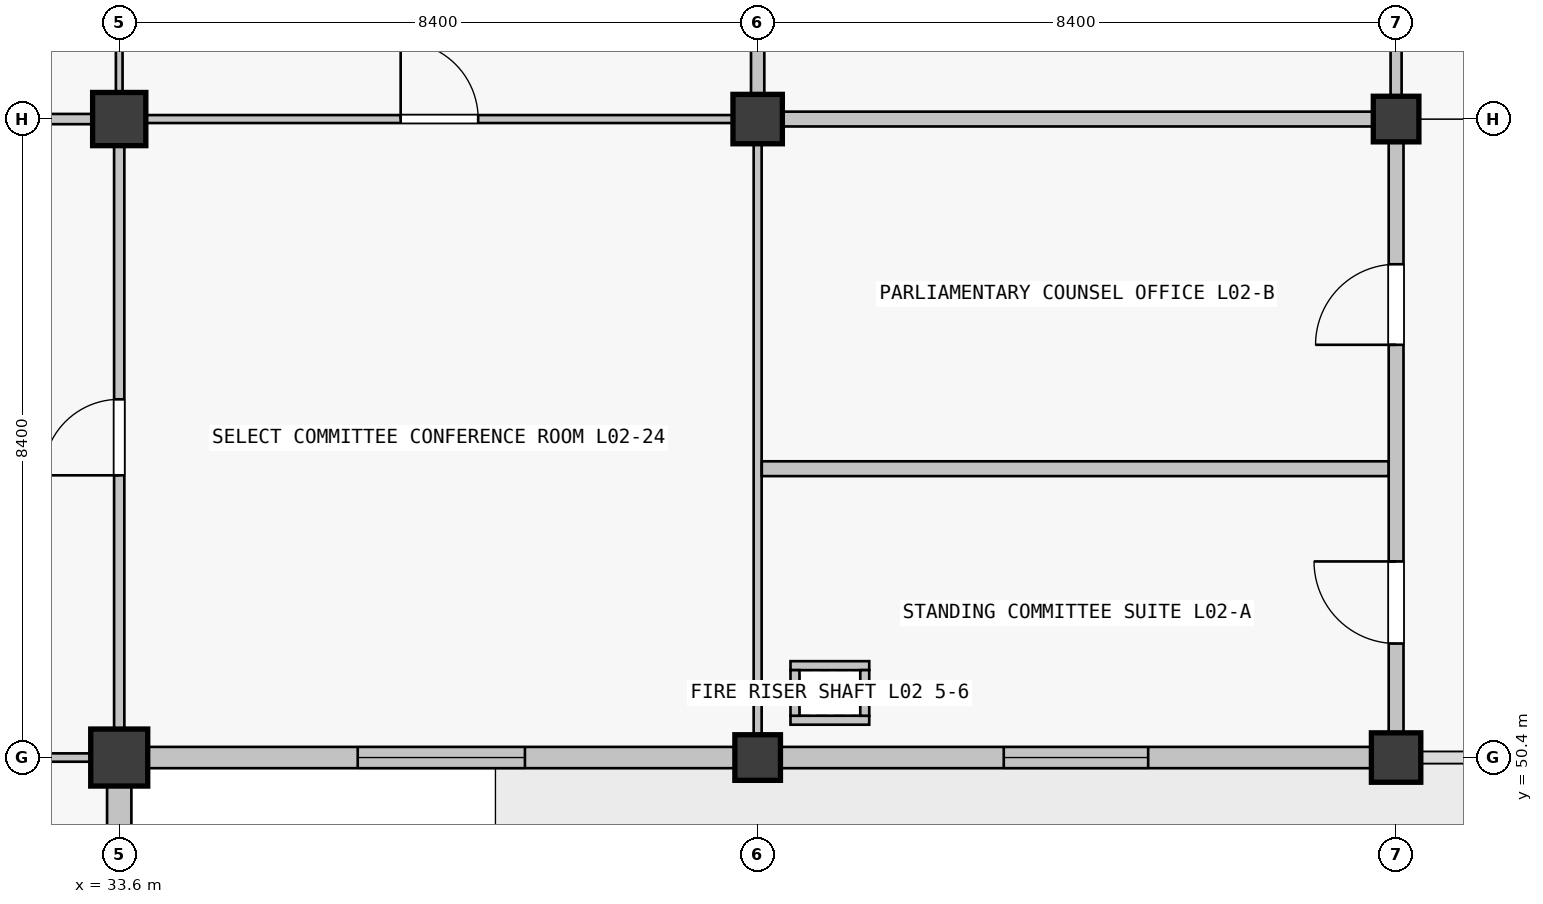
"""IFC4 building model, lengths in metres.
Left out: names, types, materials, properties, quantities, classifications, styles, units other than length and angle.
Written with IfcOpenShell. Run it as: python <this file> out.ifc"""

import sys

from ifc_helpers import new_model, si_unit, direction, frame, frame_2d, origin, origin_2d, place, context, subcontext, project, spatial, rectangle, extrude, element, fill, save


model = new_model("IFC4")
c1 = context("Model", 3, precision=1e-05, world=origin(), true_north=direction((0.0, 1.0)))
c2 = subcontext(c1, "Body", "Model", "MODEL_VIEW")
j1 = project(units=[si_unit("LENGTHUNIT", "METRE"), si_unit("PLANEANGLEUNIT", "RADIAN")], contexts=[c1])
p1 = place(None, origin())
s1 = spatial("IfcSite", under=j1, at=p1, CompositionType="ELEMENT")
p2 = place(p1, origin())
s2 = spatial("IfcBuilding", under=s1, at=p2, CompositionType="ELEMENT")
p3 = place(p2, frame((0.0, 0.0, 10.26)))
s3 = spatial("IfcBuildingStorey", under=s2, at=p3, CompositionType="ELEMENT", Elevation=10.26)
p4 = place(p3, frame((33.6, 50.4, 0.0), z_axis=(0.0, 0.0, 1.0), x_axis=(1.0, 0.0, 0.0)))
e1 = element("IfcColumn", 1, at=p4, inside=s3, PredefinedType="COLUMN", context=c2, shape_type="SweptSolid", body=[
    extrude(rectangle(XDim=0.75, YDim=0.75, at=origin_2d()), origin(), (0.0, 0.0, 1.0), 4.5),
])
p5 = place(p3, frame((33.6, 58.8, 0.0), z_axis=(0.0, 0.0, 1.0), x_axis=(1.0, 0.0, 0.0)))
e2 = element("IfcColumn", 2, at=p5, inside=s3, PredefinedType="COLUMN", context=c2, shape_type="SweptSolid", body=[
    extrude(rectangle(XDim=0.7, YDim=0.7, at=origin_2d()), origin(), (0.0, 0.0, 1.0), 4.5),
])
p6 = place(p3, frame((42.0, 50.4, 0.0), z_axis=(0.0, 0.0, 1.0), x_axis=(1.0, 0.0, 0.0)))
e3 = element("IfcColumn", 3, at=p6, inside=s3, PredefinedType="COLUMN", context=c2, shape_type="SweptSolid", body=[
    extrude(rectangle(XDim=0.6, YDim=0.6, at=origin_2d()), origin(), (0.0, 0.0, 1.0), 4.5),
])
for number, where, z_axis, x_axis in (
    (4, (42.0, 58.8, 0.0), (0.0, 0.0, 1.0), (1.0, 0.0, 0.0)),
    (5, (50.4, 50.4, 0.0), (0.0, 0.0, 1.0), (1.0, 0.0, 0.0)),
):
    element("IfcColumn", number, at=place(p3, frame(where, z_axis=z_axis, x_axis=x_axis)), inside=s3, PredefinedType="COLUMN", context=c2, shape_type="SweptSolid", body=[
        extrude(rectangle(XDim=0.65, YDim=0.65, at=origin_2d()), origin(), (0.0, 0.0, 1.0), 4.5),
    ])
p7 = place(p3, frame((50.4, 58.8, 0.0), z_axis=(0.0, 0.0, 1.0), x_axis=(1.0, 0.0, 0.0)))
e6 = element("IfcColumn", 6, at=p7, inside=s3, PredefinedType="COLUMN", context=c2, shape_type="SweptSolid", body=[
    extrude(rectangle(XDim=0.6, YDim=0.6, at=origin_2d()), origin(), (0.0, 0.0, 1.0), 4.5),
])
p8 = place(p3, frame((33.6, 50.024, 0.0), z_axis=(0.0, 0.0, 1.0), x_axis=(0.0, -1.0, 0.0)))
e7 = element("IfcWall", 7, at=p8, inside=s3, PredefinedType="SOLIDWALL", context=c2, shape_type="SweptSolid", body=[
    extrude(rectangle(XDim=7.673, YDim=0.32, at=frame_2d((3.836, 0.0))), origin(), (0.0, 0.0, 1.0), 3.54),
])
p9 = place(p8, frame((3.236, 0.0, 0.9)))
e8 = element("IfcOpeningElement", 8, at=p9, cuts=e7, PredefinedType="OPENING", context=c2, shape_type="SweptSolid", body=[
    extrude(rectangle(XDim=1.2, YDim=2.1, at=frame_2d((0.6, 1.05))), frame((0.0, 0.16, 0.0), z_axis=(0.0, -1.0, 0.0), x_axis=(1.0, 0.0, 0.0)), (0.0, 0.0, 1.0), 0.32),
])
p10 = place(p3, frame((41.699, 50.4, 0.0), z_axis=(0.0, 0.0, 1.0), x_axis=(-1.0, 0.0, 0.0)))
e9 = element("IfcWall", 9, at=p10, inside=s3, PredefinedType="SOLIDWALL", context=c2, shape_type="SweptSolid", body=[
    extrude(rectangle(XDim=7.723, YDim=0.28, at=frame_2d((3.861, 0.0))), origin(), (0.0, 0.0, 1.0), 3.54),
])
p11 = place(p10, frame((2.761, 0.0, 0.9)))
e10 = element("IfcOpeningElement", 10, at=p11, cuts=e9, PredefinedType="OPENING", context=c2, shape_type="SweptSolid", body=[
    extrude(rectangle(XDim=2.2, YDim=1.35, at=frame_2d((1.1, 0.675))), frame((0.0, 0.14, 0.0), z_axis=(0.0, -1.0, 0.0), x_axis=(1.0, 0.0, 0.0)), (0.0, 0.0, 1.0), 0.28),
])
p12 = place(p3, frame((50.074, 50.4, 0.0), z_axis=(0.0, 0.0, 1.0), x_axis=(-1.0, 0.0, 0.0)))
e11 = element("IfcWall", 11, at=p12, inside=s3, PredefinedType="SOLIDWALL", context=c2, shape_type="SweptSolid", body=[
    extrude(rectangle(XDim=7.773, YDim=0.28, at=frame_2d((3.886, 0.0))), origin(), (0.0, 0.0, 1.0), 3.54),
])
p13 = place(p12, frame((2.936, 0.0, 0.9)))
e12 = element("IfcOpeningElement", 12, at=p13, cuts=e11, PredefinedType="OPENING", context=c2, shape_type="SweptSolid", body=[
    extrude(rectangle(XDim=1.9, YDim=1.75, at=frame_2d((0.95, 0.875))), frame((0.0, 0.14, 0.0), z_axis=(0.0, -1.0, 0.0), x_axis=(1.0, 0.0, 0.0)), (0.0, 0.0, 1.0), 0.28),
])
for number, where, z_axis, x_axis in (
    (13, (42.432, 50.891, 0.0), (0.0, 0.0, 1.0), (1.0, 0.0, 0.0)),
    (14, (42.432, 51.609, 0.0), (0.0, 0.0, 1.0), (1.0, 0.0, 0.0)),
):
    element("IfcWall", number, at=place(p3, frame(where, z_axis=z_axis, x_axis=x_axis)), inside=s3, PredefinedType="PARTITIONING", context=c2, shape_type="SweptSolid", body=[
        extrude(rectangle(XDim=1.036, YDim=0.118, at=frame_2d((0.518, 0.0))), origin(), (0.0, 0.0, 1.0), 3.53),
    ])
for number, where, z_axis, x_axis in (
    (15, (42.491, 50.95, 0.0), (0.0, 0.0, 1.0), (0.0, 1.0, 0.0)),
    (16, (43.409, 50.95, 0.0), (0.0, 0.0, 1.0), (0.0, 1.0, 0.0)),
):
    element("IfcWall", number, at=place(p3, frame(where, z_axis=z_axis, x_axis=x_axis)), inside=s3, PredefinedType="PARTITIONING", context=c2, shape_type="SweptSolid", body=[
        extrude(rectangle(XDim=0.6, YDim=0.118, at=frame_2d((0.3, 0.0))), origin(), (0.0, 0.0, 1.0), 3.53),
    ])
p14 = place(p3, frame((25.552, 50.4, 0.0), z_axis=(0.0, 0.0, 1.0), x_axis=(1.0, 0.0, 0.0)))
e17 = element("IfcWall", 17, at=p14, inside=s3, PredefinedType="MOVABLE", context=c2, shape_type="SweptSolid", body=[
    extrude(rectangle(XDim=7.671, YDim=0.11, at=frame_2d((3.835, 0.0))), origin(), (0.0, 0.0, 1.0), 3.37),
])
p15 = place(p14, frame((3.296, 0.0, 0.0)))
e18 = element("IfcOpeningElement", 18, at=p15, cuts=e17, PredefinedType="OPENING", context=c2, shape_type="SweptSolid", body=[
    extrude(rectangle(XDim=1.08, YDim=2.25, at=frame_2d((0.54, 1.125))), frame((0.0, 0.055, 0.0), z_axis=(0.0, -1.0, 0.0), x_axis=(1.0, 0.0, 0.0)), (0.0, 0.0, 1.0), 0.11),
])
p16 = place(p3, frame((25.577, 58.8, 0.0), z_axis=(0.0, 0.0, 1.0), x_axis=(1.0, 0.0, 0.0)))
e19 = element("IfcWall", 19, at=p16, inside=s3, PredefinedType="PARTITIONING", context=c2, shape_type="SweptSolid", body=[
    extrude(rectangle(XDim=7.671, YDim=0.135, at=frame_2d((3.835, 0.0))), origin(), (0.0, 0.0, 1.0), 3.37),
])
p17 = place(p16, frame((3.306, 0.0, 0.0)))
e20 = element("IfcOpeningElement", 20, at=p17, cuts=e19, PredefinedType="OPENING", context=c2, shape_type="SweptSolid", body=[
    extrude(rectangle(XDim=1.06, YDim=2.25, at=frame_2d((0.53, 1.125))), frame((0.0, 0.067, 0.0), z_axis=(0.0, -1.0, 0.0), x_axis=(1.0, 0.0, 0.0)), (0.0, 0.0, 1.0), 0.135),
])
p18 = place(p3, frame((33.952, 58.8, 0.0), z_axis=(0.0, 0.0, 1.0), x_axis=(1.0, 0.0, 0.0)))
e21 = element("IfcWall", 21, at=p18, inside=s3, PredefinedType="PARTITIONING", context=c2, shape_type="SweptSolid", body=[
    extrude(rectangle(XDim=7.721, YDim=0.105, at=frame_2d((3.861, 0.0))), origin(), (0.0, 0.0, 1.0), 3.37),
])
p19 = place(p18, frame((3.351, 0.0, 0.0)))
e22 = element("IfcOpeningElement", 22, at=p19, cuts=e21, PredefinedType="OPENING", context=c2, shape_type="SweptSolid", body=[
    extrude(rectangle(XDim=1.02, YDim=2.2, at=frame_2d((0.51, 1.1))), frame((0.0, 0.052, 0.0), z_axis=(0.0, -1.0, 0.0), x_axis=(1.0, 0.0, 0.0)), (0.0, 0.0, 1.0), 0.105),
])
p20 = place(p3, frame((42.327, 58.8, 0.0), z_axis=(0.0, 0.0, 1.0), x_axis=(1.0, 0.0, 0.0)))
e23 = element("IfcWall", 23, at=p20, inside=s3, PredefinedType="PARTITIONING", context=c2, shape_type="SweptSolid", body=[
    extrude(rectangle(XDim=7.771, YDim=0.195, at=frame_2d((3.885, 0.0))), origin(), (0.0, 0.0, 1.0), 3.37),
])
p21 = place(p3, frame((33.6, 50.777, 0.0), z_axis=(0.0, 0.0, 1.0), x_axis=(0.0, 1.0, 0.0)))
e24 = element("IfcWall", 24, at=p21, inside=s3, PredefinedType="PARTITIONING", context=c2, shape_type="SweptSolid", body=[
    extrude(rectangle(XDim=7.671, YDim=0.135, at=frame_2d((3.835, 0.0))), origin(), (0.0, 0.0, 1.0), 3.37),
])
p22 = place(p21, frame((3.336, 0.0, 0.0)))
e25 = element("IfcOpeningElement", 25, at=p22, cuts=e24, PredefinedType="OPENING", context=c2, shape_type="SweptSolid", body=[
    extrude(rectangle(XDim=1.0, YDim=2.2, at=frame_2d((0.5, 1.1))), frame((0.0, 0.067, 0.0), z_axis=(0.0, -1.0, 0.0), x_axis=(1.0, 0.0, 0.0)), (0.0, 0.0, 1.0), 0.135),
])
p23 = place(p3, frame((33.6, 59.152, 0.0), z_axis=(0.0, 0.0, 1.0), x_axis=(0.0, 1.0, 0.0)))
e26 = element("IfcWall", 26, at=p23, inside=s3, PredefinedType="PARTITIONING", context=c2, shape_type="SweptSolid", body=[
    extrude(rectangle(XDim=7.671, YDim=0.088, at=frame_2d((3.835, 0.0))), origin(), (0.0, 0.0, 1.0), 3.37),
])
p24 = place(p23, frame((3.365, 0.0, 0.0)))
e27 = element("IfcOpeningElement", 27, at=p24, cuts=e26, PredefinedType="OPENING", context=c2, shape_type="SweptSolid", body=[
    extrude(rectangle(XDim=0.94, YDim=2.15, at=frame_2d((0.47, 1.075))), frame((0.0, 0.044, 0.0), z_axis=(0.0, -1.0, 0.0), x_axis=(1.0, 0.0, 0.0)), (0.0, 0.0, 1.0), 0.088),
])
p25 = place(p3, frame((42.0, 50.702, 0.0), z_axis=(0.0, 0.0, 1.0), x_axis=(0.0, 1.0, 0.0)))
e28 = element("IfcWall", 28, at=p25, inside=s3, PredefinedType="PARTITIONING", context=c2, shape_type="SweptSolid", body=[
    extrude(rectangle(XDim=7.771, YDim=0.105, at=frame_2d((3.885, 0.0))), origin(), (0.0, 0.0, 1.0), 3.37),
])
p26 = place(p3, frame((42.0, 59.127, 0.0), z_axis=(0.0, 0.0, 1.0), x_axis=(0.0, 1.0, 0.0)))
e29 = element("IfcWall", 29, at=p26, inside=s3, PredefinedType="PARTITIONING", context=c2, shape_type="SweptSolid", body=[
    extrude(rectangle(XDim=7.721, YDim=0.175, at=frame_2d((3.86, 0.0))), origin(), (0.0, 0.0, 1.0), 3.37),
])
p27 = place(p3, frame((50.4, 50.727, 0.0), z_axis=(0.0, 0.0, 1.0), x_axis=(0.0, 1.0, 0.0)))
e30 = element("IfcWall", 30, at=p27, inside=s3, PredefinedType="PARTITIONING", context=c2, shape_type="SweptSolid", body=[
    extrude(rectangle(XDim=7.771, YDim=0.195, at=frame_2d((3.885, 0.0))), origin(), (0.0, 0.0, 1.0), 3.37),
])
p28 = place(p27, frame((1.173, 0.0, 0.0)))
e31 = element("IfcOpeningElement", 31, at=p28, cuts=e30, PredefinedType="OPENING", context=c2, shape_type="SweptSolid", body=[
    extrude(rectangle(XDim=1.08, YDim=2.25, at=frame_2d((0.54, 1.125))), frame((0.0, 0.098, 0.0), z_axis=(0.0, -1.0, 0.0), x_axis=(1.0, 0.0, 0.0)), (0.0, 0.0, 1.0), 0.195),
])
p29 = place(p27, frame((5.103, 0.0, 0.0)))
e32 = element("IfcOpeningElement", 32, at=p29, cuts=e30, PredefinedType="OPENING", context=c2, shape_type="SweptSolid", body=[
    extrude(rectangle(XDim=1.06, YDim=2.25, at=frame_2d((0.53, 1.125))), frame((0.0, 0.098, 0.0), z_axis=(0.0, -1.0, 0.0), x_axis=(1.0, 0.0, 0.0)), (0.0, 0.0, 1.0), 0.195),
])
p30 = place(p3, frame((50.4, 59.102, 0.0), z_axis=(0.0, 0.0, 1.0), x_axis=(0.0, 1.0, 0.0)))
e33 = element("IfcWall", 33, at=p30, inside=s3, PredefinedType="PARTITIONING", context=c2, shape_type="SweptSolid", body=[
    extrude(rectangle(XDim=7.721, YDim=0.145, at=frame_2d((3.86, 0.0))), origin(), (0.0, 0.0, 1.0), 3.37),
])
p31 = place(p30, frame((1.218, 0.0, 0.0)))
e34 = element("IfcOpeningElement", 34, at=p31, cuts=e33, PredefinedType="OPENING", context=c2, shape_type="SweptSolid", body=[
    extrude(rectangle(XDim=1.04, YDim=2.2, at=frame_2d((0.52, 1.1))), frame((0.0, 0.073, 0.0), z_axis=(0.0, -1.0, 0.0), x_axis=(1.0, 0.0, 0.0)), (0.0, 0.0, 1.0), 0.145),
])
p32 = place(p30, frame((5.148, 0.0, 0.0)))
e35 = element("IfcOpeningElement", 35, at=p32, cuts=e33, PredefinedType="OPENING", context=c2, shape_type="SweptSolid", body=[
    extrude(rectangle(XDim=1.02, YDim=2.2, at=frame_2d((0.51, 1.1))), frame((0.0, 0.073, 0.0), z_axis=(0.0, -1.0, 0.0), x_axis=(1.0, 0.0, 0.0)), (0.0, 0.0, 1.0), 0.145),
])
p33 = place(p3, frame((42.054, 54.2, 0.0), z_axis=(0.0, 0.0, 1.0), x_axis=(1.0, 0.0, 0.0)))
e36 = element("IfcWall", 36, at=p33, inside=s3, PredefinedType="PARTITIONING", context=c2, shape_type="SweptSolid", body=[
    extrude(rectangle(XDim=8.246, YDim=0.195, at=frame_2d((4.123, 0.0))), origin(), (0.0, 0.0, 1.0), 3.37),
])
p34 = place(p11, origin())
e37 = element("IfcWindow", 37, at=p34, inside=s3, PartitioningType="SINGLE_PANEL", PredefinedType="WINDOW", context=c2, shape_type="SweptSolid", body=[
    extrude(rectangle(XDim=2.2, YDim=1.35, at=frame_2d((1.1, 0.675))), frame((0.0, 0.03, 0.0), z_axis=(0.0, -1.0, 0.0), x_axis=(1.0, 0.0, 0.0)), (0.0, 0.0, 1.0), 0.06),
])
fill(e10, e37)
p35 = place(p13, origin())
e38 = element("IfcWindow", 38, at=p35, inside=s3, PartitioningType="SINGLE_PANEL", PredefinedType="WINDOW", context=c2, shape_type="SweptSolid", body=[
    extrude(rectangle(XDim=1.9, YDim=1.75, at=frame_2d((0.95, 0.875))), frame((0.0, 0.03, 0.0), z_axis=(0.0, -1.0, 0.0), x_axis=(1.0, 0.0, 0.0)), (0.0, 0.0, 1.0), 0.06),
])
fill(e12, e38)
p36 = place(p28, origin())
e39 = element("IfcDoor", 39, at=p36, inside=s3, OperationType="SINGLE_SWING_RIGHT", PredefinedType="DOOR", context=c2, shape_type="SweptSolid", body=[
    extrude(rectangle(XDim=1.08, YDim=2.25, at=frame_2d((0.54, 1.125))), frame((0.0, 0.025, 0.0), z_axis=(0.0, -1.0, 0.0), x_axis=(1.0, 0.0, 0.0)), (0.0, 0.0, 1.0), 0.05),
])
fill(e31, e39)
p37 = place(p29, origin())
e40 = element("IfcDoor", 40, at=p37, inside=s3, OperationType="SINGLE_SWING_LEFT", PredefinedType="DOOR", context=c2, shape_type="SweptSolid", body=[
    extrude(rectangle(XDim=1.06, YDim=2.25, at=frame_2d((0.53, 1.125))), frame((0.0, 0.025, 0.0), z_axis=(0.0, -1.0, 0.0), x_axis=(1.0, 0.0, 0.0)), (0.0, 0.0, 1.0), 0.05),
])
fill(e32, e40)
p38 = place(p19, origin())
e41 = element("IfcDoor", 41, at=p38, inside=s3, OperationType="SINGLE_SWING_LEFT", PredefinedType="DOOR", context=c2, shape_type="SweptSolid", body=[
    extrude(rectangle(XDim=1.02, YDim=2.2, at=frame_2d((0.51, 1.1))), frame((0.0, 0.025, 0.0), z_axis=(0.0, -1.0, 0.0), x_axis=(1.0, 0.0, 0.0)), (0.0, 0.0, 1.0), 0.05),
])
fill(e22, e41)
p39 = place(p22, origin())
e42 = element("IfcDoor", 42, at=p39, inside=s3, OperationType="SINGLE_SWING_LEFT", PredefinedType="DOOR", context=c2, shape_type="SweptSolid", body=[
    extrude(rectangle(XDim=1.0, YDim=2.2, at=frame_2d((0.5, 1.1))), frame((0.0, 0.025, 0.0), z_axis=(0.0, -1.0, 0.0), x_axis=(1.0, 0.0, 0.0)), (0.0, 0.0, 1.0), 0.05),
])
fill(e25, e42)
save(model, sys.argv[1])
